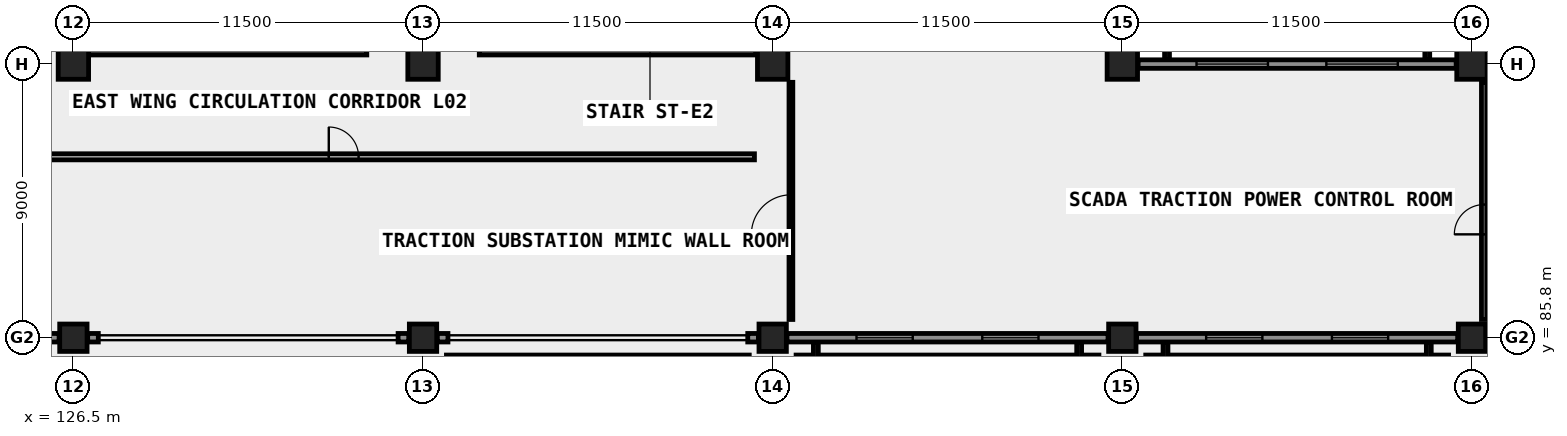
"""IFC4 building model, lengths in metres.
Left out: names, types, materials, properties, quantities, classifications, styles, units other than length and angle.
Written with IfcOpenShell. Run it as: python <this file> out.ifc"""

import sys

from ifc_helpers import new_model, si_unit, direction, frame, frame_2d, origin, origin_2d, place, context, subcontext, project, spatial, rectangle, extrude, element, fill, save


model = new_model("IFC4")
c1 = context("Model", 3, precision=1e-05, world=origin(), true_north=direction((0.0, 1.0)))
c2 = subcontext(c1, "Body", "Model", "MODEL_VIEW")
j1 = project(units=[si_unit("LENGTHUNIT", "METRE"), si_unit("PLANEANGLEUNIT", "RADIAN")], contexts=[c1])
p1 = place(None, origin())
s1 = spatial("IfcSite", under=j1, at=p1, CompositionType="ELEMENT")
p2 = place(p1, origin())
s2 = spatial("IfcBuilding", under=s1, at=p2, CompositionType="ELEMENT")
p3 = place(p2, frame((0.0, 0.0, 8.4)))
s3 = spatial("IfcBuildingStorey", under=s2, at=p3, CompositionType="ELEMENT", Elevation=8.4)
p4 = place(p3, frame((126.5, 85.8, 0.0), z_axis=(0.0, 0.0, 1.0), x_axis=(1.0, 0.0, 0.0)))
e1 = element("IfcColumn", 1, at=p4, inside=s3, PredefinedType="COLUMN", context=c2, shape_type="SweptSolid", body=[
    extrude(rectangle(XDim=0.9, YDim=0.9, at=origin_2d()), origin(), (0.0, 0.0, 1.0), 5.4),
])
p5 = place(p3, frame((126.5, 94.8, 0.0), z_axis=(0.0, 0.0, 1.0), x_axis=(1.0, 0.0, 0.0)))
e2 = element("IfcColumn", 2, at=p5, inside=s3, PredefinedType="COLUMN", context=c2, shape_type="SweptSolid", body=[
    extrude(rectangle(XDim=1.0, YDim=1.0, at=origin_2d()), origin(), (0.0, 0.0, 1.0), 5.4),
])
p6 = place(p3, frame((138.0, 85.8, 0.0), z_axis=(0.0, 0.0, 1.0), x_axis=(1.0, 0.0, 0.0)))
e3 = element("IfcColumn", 3, at=p6, inside=s3, PredefinedType="COLUMN", context=c2, shape_type="SweptSolid", body=[
    extrude(rectangle(XDim=0.9, YDim=0.9, at=origin_2d()), origin(), (0.0, 0.0, 1.0), 5.4),
])
p7 = place(p3, frame((138.0, 94.8, 0.0), z_axis=(0.0, 0.0, 1.0), x_axis=(1.0, 0.0, 0.0)))
e4 = element("IfcColumn", 4, at=p7, inside=s3, PredefinedType="COLUMN", context=c2, shape_type="SweptSolid", body=[
    extrude(rectangle(XDim=1.0, YDim=1.0, at=origin_2d()), origin(), (0.0, 0.0, 1.0), 5.4),
])
p8 = place(p3, frame((149.5, 85.8, 0.0), z_axis=(0.0, 0.0, 1.0), x_axis=(1.0, 0.0, 0.0)))
e5 = element("IfcColumn", 5, at=p8, inside=s3, PredefinedType="COLUMN", context=c2, shape_type="SweptSolid", body=[
    extrude(rectangle(XDim=0.9, YDim=0.9, at=origin_2d()), origin(), (0.0, 0.0, 1.0), 5.4),
])
p9 = place(p3, frame((149.5, 94.8, 0.0), z_axis=(0.0, 0.0, 1.0), x_axis=(1.0, 0.0, 0.0)))
e6 = element("IfcColumn", 6, at=p9, inside=s3, PredefinedType="COLUMN", context=c2, shape_type="SweptSolid", body=[
    extrude(rectangle(XDim=1.0, YDim=1.0, at=origin_2d()), origin(), (0.0, 0.0, 1.0), 5.4),
])
p10 = place(p3, frame((161.0, 85.8, 0.0), z_axis=(0.0, 0.0, 1.0), x_axis=(1.0, 0.0, 0.0)))
e7 = element("IfcColumn", 7, at=p10, inside=s3, PredefinedType="COLUMN", context=c2, shape_type="SweptSolid", body=[
    extrude(rectangle(XDim=0.9, YDim=0.9, at=origin_2d()), origin(), (0.0, 0.0, 1.0), 5.4),
])
p11 = place(p3, frame((161.0, 94.8, 0.0), z_axis=(0.0, 0.0, 1.0), x_axis=(1.0, 0.0, 0.0)))
e8 = element("IfcColumn", 8, at=p11, inside=s3, PredefinedType="COLUMN", context=c2, shape_type="SweptSolid", body=[
    extrude(rectangle(XDim=1.0, YDim=1.0, at=origin_2d()), origin(), (0.0, 0.0, 1.0), 5.4),
])
p12 = place(p3, frame((172.5, 85.8, 0.0), z_axis=(0.0, 0.0, 1.0), x_axis=(1.0, 0.0, 0.0)))
e9 = element("IfcColumn", 9, at=p12, inside=s3, PredefinedType="COLUMN", context=c2, shape_type="SweptSolid", body=[
    extrude(rectangle(XDim=0.9, YDim=0.9, at=origin_2d()), origin(), (0.0, 0.0, 1.0), 5.4),
])
p13 = place(p3, frame((172.5, 94.8, 0.0), z_axis=(0.0, 0.0, 1.0), x_axis=(1.0, 0.0, 0.0)))
e10 = element("IfcColumn", 10, at=p13, inside=s3, PredefinedType="COLUMN", context=c2, shape_type="SweptSolid", body=[
    extrude(rectangle(XDim=1.0, YDim=1.0, at=origin_2d()), origin(), (0.0, 0.0, 1.0), 5.4),
])
p14 = place(p3, frame((127.0, 95.325, 0.0), z_axis=(0.0, 0.0, 1.0), x_axis=(1.0, 0.0, 0.0)))
e11 = element("IfcWall", 11, at=p14, inside=s3, PredefinedType="SHEAR", context=c2, shape_type="SweptSolid", body=[
    extrude(rectangle(XDim=9.15, YDim=0.45, at=frame_2d((4.575, 0.0))), origin(), (0.0, 0.0, 1.0), 5.4),
])
p15 = place(p3, frame((139.85, 95.325, 0.0), z_axis=(0.0, 0.0, 1.0), x_axis=(1.0, 0.0, 0.0)))
e12 = element("IfcWall", 12, at=p15, inside=s3, PredefinedType="SHEAR", context=c2, shape_type="SweptSolid", body=[
    extrude(rectangle(XDim=9.1, YDim=0.45, at=frame_2d((4.55, 0.0))), origin(), (0.0, 0.0, 1.0), 5.4),
])
p16 = place(p3, frame((115.47, 85.8, 0.0), z_axis=(0.0, 0.0, 1.0), x_axis=(1.0, 0.0, 0.0)))
e13 = element("IfcWall", 13, at=p16, inside=s3, PredefinedType="SOLIDWALL", context=c2, shape_type="SweptSolid", body=[
    extrude(rectangle(XDim=10.56, YDim=0.28, at=frame_2d((5.28, 0.0))), origin(), (0.0, 0.0, 1.0), 4.35),
])
p17 = place(p16, frame((2.287, 0.0, 0.85)))
e14 = element("IfcOpeningElement", 14, at=p17, cuts=e13, PredefinedType="OPENING", context=c2, shape_type="SweptSolid", body=[
    extrude(rectangle(XDim=1.85, YDim=1.85, at=frame_2d((0.925, 0.925))), frame((0.0, 0.15, 0.0), z_axis=(0.0, -1.0, 0.0), x_axis=(1.0, 0.0, 0.0)), (0.0, 0.0, 1.0), 0.3),
])
p18 = place(p16, frame((6.423, 0.0, 0.85)))
e15 = element("IfcOpeningElement", 15, at=p18, cuts=e13, PredefinedType="OPENING", context=c2, shape_type="SweptSolid", body=[
    extrude(rectangle(XDim=1.85, YDim=1.85, at=frame_2d((0.925, 0.925))), frame((0.0, 0.15, 0.0), z_axis=(0.0, -1.0, 0.0), x_axis=(1.0, 0.0, 0.0)), (0.0, 0.0, 1.0), 0.3),
])
for number, where, z_axis, x_axis in (
    (16, (126.97, 85.8, 0.0), (0.0, 0.0, 1.0), (1.0, 0.0, 0.0)),
    (17, (137.18, 85.8, 0.0), (0.0, 0.0, 1.0), (1.0, 0.0, 0.0)),
    (18, (138.47, 85.8, 0.0), (0.0, 0.0, 1.0), (1.0, 0.0, 0.0)),
    (19, (148.68, 85.8, 0.0), (0.0, 0.0, 1.0), (1.0, 0.0, 0.0)),
):
    element("IfcWall", number, at=place(p3, frame(where, z_axis=z_axis, x_axis=x_axis)), inside=s3, PredefinedType="SOLIDWALL", context=c2, shape_type="SweptSolid", body=[
        extrude(rectangle(XDim=0.35, YDim=0.28, at=frame_2d((0.175, 0.0))), origin(), (0.0, 0.0, 1.0), 5.13),
    ])
p19 = place(p3, frame((149.97, 85.8, 0.0), z_axis=(0.0, 0.0, 1.0), x_axis=(1.0, 0.0, 0.0)))
e20 = element("IfcWall", 20, at=p19, inside=s3, PredefinedType="SOLIDWALL", context=c2, shape_type="SweptSolid", body=[
    extrude(rectangle(XDim=10.56, YDim=0.28, at=frame_2d((5.28, 0.0))), origin(), (0.0, 0.0, 1.0), 4.35),
])
p20 = place(p19, frame((2.287, 0.0, 0.85)))
e21 = element("IfcOpeningElement", 21, at=p20, cuts=e20, PredefinedType="OPENING", context=c2, shape_type="SweptSolid", body=[
    extrude(rectangle(XDim=1.85, YDim=1.85, at=frame_2d((0.925, 0.925))), frame((0.0, 0.15, 0.0), z_axis=(0.0, -1.0, 0.0), x_axis=(1.0, 0.0, 0.0)), (0.0, 0.0, 1.0), 0.3),
])
p21 = place(p19, frame((6.423, 0.0, 0.85)))
e22 = element("IfcOpeningElement", 22, at=p21, cuts=e20, PredefinedType="OPENING", context=c2, shape_type="SweptSolid", body=[
    extrude(rectangle(XDim=1.85, YDim=1.85, at=frame_2d((0.925, 0.925))), frame((0.0, 0.15, 0.0), z_axis=(0.0, -1.0, 0.0), x_axis=(1.0, 0.0, 0.0)), (0.0, 0.0, 1.0), 0.3),
])
p22 = place(p3, frame((161.47, 85.8, 0.0), z_axis=(0.0, 0.0, 1.0), x_axis=(1.0, 0.0, 0.0)))
e23 = element("IfcWall", 23, at=p22, inside=s3, PredefinedType="SOLIDWALL", context=c2, shape_type="SweptSolid", body=[
    extrude(rectangle(XDim=10.56, YDim=0.28, at=frame_2d((5.28, 0.0))), origin(), (0.0, 0.0, 1.0), 4.35),
])
p23 = place(p22, frame((2.287, 0.0, 0.85)))
e24 = element("IfcOpeningElement", 24, at=p23, cuts=e23, PredefinedType="OPENING", context=c2, shape_type="SweptSolid", body=[
    extrude(rectangle(XDim=1.85, YDim=1.85, at=frame_2d((0.925, 0.925))), frame((0.0, 0.15, 0.0), z_axis=(0.0, -1.0, 0.0), x_axis=(1.0, 0.0, 0.0)), (0.0, 0.0, 1.0), 0.3),
])
p24 = place(p22, frame((6.423, 0.0, 0.85)))
e25 = element("IfcOpeningElement", 25, at=p24, cuts=e23, PredefinedType="OPENING", context=c2, shape_type="SweptSolid", body=[
    extrude(rectangle(XDim=1.85, YDim=1.85, at=frame_2d((0.925, 0.925))), frame((0.0, 0.15, 0.0), z_axis=(0.0, -1.0, 0.0), x_axis=(1.0, 0.0, 0.0)), (0.0, 0.0, 1.0), 0.3),
])
p25 = place(p3, frame((172.97, 85.8, 0.0), z_axis=(0.0, 0.0, 1.0), x_axis=(1.0, 0.0, 0.0)))
e26 = element("IfcWall", 26, at=p25, inside=s3, PredefinedType="SOLIDWALL", context=c2, shape_type="SweptSolid", body=[
    extrude(rectangle(XDim=10.56, YDim=0.28, at=frame_2d((5.28, 0.0))), origin(), (0.0, 0.0, 1.0), 4.35),
])
p26 = place(p25, frame((2.287, 0.0, 0.85)))
e27 = element("IfcOpeningElement", 27, at=p26, cuts=e26, PredefinedType="OPENING", context=c2, shape_type="SweptSolid", body=[
    extrude(rectangle(XDim=1.85, YDim=1.85, at=frame_2d((0.925, 0.925))), frame((0.0, 0.15, 0.0), z_axis=(0.0, -1.0, 0.0), x_axis=(1.0, 0.0, 0.0)), (0.0, 0.0, 1.0), 0.3),
])
p27 = place(p25, frame((6.423, 0.0, 0.85)))
e28 = element("IfcOpeningElement", 28, at=p27, cuts=e26, PredefinedType="OPENING", context=c2, shape_type="SweptSolid", body=[
    extrude(rectangle(XDim=1.85, YDim=1.85, at=frame_2d((0.925, 0.925))), frame((0.0, 0.15, 0.0), z_axis=(0.0, -1.0, 0.0), x_axis=(1.0, 0.0, 0.0)), (0.0, 0.0, 1.0), 0.3),
])
p28 = place(p3, frame((161.52, 94.8, 0.0), z_axis=(0.0, 0.0, 1.0), x_axis=(1.0, 0.0, 0.0)))
e29 = element("IfcWall", 29, at=p28, inside=s3, PredefinedType="SOLIDWALL", context=c2, shape_type="SweptSolid", body=[
    extrude(rectangle(XDim=10.46, YDim=0.28, at=frame_2d((5.23, 0.0))), origin(), (0.0, 0.0, 1.0), 4.35),
])
p29 = place(p28, frame((1.92, 0.0, 0.85)))
e30 = element("IfcOpeningElement", 30, at=p29, cuts=e29, PredefinedType="OPENING", context=c2, shape_type="SweptSolid", body=[
    extrude(rectangle(XDim=2.35, YDim=2.05, at=frame_2d((1.175, 1.025))), frame((0.0, 0.15, 0.0), z_axis=(0.0, -1.0, 0.0), x_axis=(1.0, 0.0, 0.0)), (0.0, 0.0, 1.0), 0.3),
])
p30 = place(p28, frame((6.19, 0.0, 0.85)))
e31 = element("IfcOpeningElement", 31, at=p30, cuts=e29, PredefinedType="OPENING", context=c2, shape_type="SweptSolid", body=[
    extrude(rectangle(XDim=2.35, YDim=2.05, at=frame_2d((1.175, 1.025))), frame((0.0, 0.15, 0.0), z_axis=(0.0, -1.0, 0.0), x_axis=(1.0, 0.0, 0.0)), (0.0, 0.0, 1.0), 0.3),
])
p31 = place(p3, frame((118.4, 91.75, 0.0), z_axis=(0.0, 0.0, 1.0), x_axis=(1.0, 0.0, 0.0)))
e32 = element("IfcWall", 32, at=p31, inside=s3, PredefinedType="PARTITIONING", context=c2, shape_type="SweptSolid", body=[
    extrude(rectangle(XDim=30.5, YDim=0.2, at=frame_2d((15.25, 0.0))), origin(), (0.0, 0.0, 1.0), 5.12),
])
p32 = place(p31, frame((4.2, 0.0, 0.0)))
e33 = element("IfcOpeningElement", 33, at=p32, cuts=e32, PredefinedType="OPENING", context=c2, shape_type="SweptSolid", body=[
    extrude(rectangle(XDim=1.8, YDim=2.2, at=frame_2d((0.9, 1.1))), frame((0.0, 0.11, 0.0), z_axis=(0.0, -1.0, 0.0), x_axis=(1.0, 0.0, 0.0)), (0.0, 0.0, 1.0), 0.22),
])
p33 = place(p31, frame((16.5, 0.0, 0.0)))
e34 = element("IfcOpeningElement", 34, at=p33, cuts=e32, PredefinedType="OPENING", context=c2, shape_type="SweptSolid", body=[
    extrude(rectangle(XDim=0.98, YDim=2.15, at=frame_2d((0.49, 1.075))), frame((0.0, 0.11, 0.0), z_axis=(0.0, -1.0, 0.0), x_axis=(1.0, 0.0, 0.0)), (0.0, 0.0, 1.0), 0.22),
])
p34 = place(p3, frame((150.1, 86.4, 0.0), z_axis=(0.0, 0.0, 1.0), x_axis=(0.0, 1.0, 0.0)))
e35 = element("IfcWall", 35, at=p34, inside=s3, PredefinedType="MOVABLE", context=c2, shape_type="SweptSolid", body=[
    extrude(rectangle(XDim=7.8, YDim=0.125, at=frame_2d((3.9, 0.0))), origin(), (0.0, 0.0, 1.0), 5.12),
])
p35 = place(p34, frame((2.8, 0.0, 0.0)))
e36 = element("IfcOpeningElement", 36, at=p35, cuts=e35, PredefinedType="OPENING", context=c2, shape_type="SweptSolid", body=[
    extrude(rectangle(XDim=1.3, YDim=2.2, at=frame_2d((0.65, 1.1))), frame((0.0, 0.073, 0.0), z_axis=(0.0, -1.0, 0.0), x_axis=(1.0, 0.0, 0.0)), (0.0, 0.0, 1.0), 0.145),
])
p36 = place(p3, frame((172.9, 86.4, 0.0), z_axis=(0.0, 0.0, 1.0), x_axis=(0.0, 1.0, 0.0)))
e37 = element("IfcWall", 37, at=p36, inside=s3, PredefinedType="PARTITIONING", context=c2, shape_type="SweptSolid", body=[
    extrude(rectangle(XDim=7.8, YDim=0.175, at=frame_2d((3.9, 0.0))), origin(), (0.0, 0.0, 1.0), 5.12),
])
p37 = place(p36, frame((2.8, 0.0, 0.0)))
e38 = element("IfcOpeningElement", 38, at=p37, cuts=e37, PredefinedType="OPENING", context=c2, shape_type="SweptSolid", body=[
    extrude(rectangle(XDim=0.98, YDim=2.15, at=frame_2d((0.49, 1.075))), frame((0.0, 0.098, 0.0), z_axis=(0.0, -1.0, 0.0), x_axis=(1.0, 0.0, 0.0)), (0.0, 0.0, 1.0), 0.195),
])
p38 = place(p20, origin())
e39 = element("IfcWindow", 39, at=p38, inside=s3, PartitioningType="SINGLE_PANEL", PredefinedType="WINDOW", context=c2, shape_type="SweptSolid", body=[
    extrude(rectangle(XDim=1.85, YDim=1.85, at=frame_2d((0.925, 0.925))), frame((0.0, 0.03, 0.0), z_axis=(0.0, -1.0, 0.0), x_axis=(1.0, 0.0, 0.0)), (0.0, 0.0, 1.0), 0.06),
])
fill(e21, e39)
p39 = place(p21, origin())
e40 = element("IfcWindow", 40, at=p39, inside=s3, PartitioningType="SINGLE_PANEL", PredefinedType="WINDOW", context=c2, shape_type="SweptSolid", body=[
    extrude(rectangle(XDim=1.85, YDim=1.85, at=frame_2d((0.925, 0.925))), frame((0.0, 0.03, 0.0), z_axis=(0.0, -1.0, 0.0), x_axis=(1.0, 0.0, 0.0)), (0.0, 0.0, 1.0), 0.06),
])
fill(e22, e40)
p40 = place(p23, origin())
e41 = element("IfcWindow", 41, at=p40, inside=s3, PartitioningType="SINGLE_PANEL", PredefinedType="WINDOW", context=c2, shape_type="SweptSolid", body=[
    extrude(rectangle(XDim=1.85, YDim=1.85, at=frame_2d((0.925, 0.925))), frame((0.0, 0.03, 0.0), z_axis=(0.0, -1.0, 0.0), x_axis=(1.0, 0.0, 0.0)), (0.0, 0.0, 1.0), 0.06),
])
fill(e24, e41)
p41 = place(p24, origin())
e42 = element("IfcWindow", 42, at=p41, inside=s3, PartitioningType="SINGLE_PANEL", PredefinedType="WINDOW", context=c2, shape_type="SweptSolid", body=[
    extrude(rectangle(XDim=1.85, YDim=1.85, at=frame_2d((0.925, 0.925))), frame((0.0, 0.03, 0.0), z_axis=(0.0, -1.0, 0.0), x_axis=(1.0, 0.0, 0.0)), (0.0, 0.0, 1.0), 0.06),
])
fill(e25, e42)
p42 = place(p29, origin())
e43 = element("IfcWindow", 43, at=p42, inside=s3, PartitioningType="SINGLE_PANEL", PredefinedType="WINDOW", context=c2, shape_type="SweptSolid", body=[
    extrude(rectangle(XDim=2.35, YDim=2.05, at=frame_2d((1.175, 1.025))), frame((0.0, 0.03, 0.0), z_axis=(0.0, -1.0, 0.0), x_axis=(1.0, 0.0, 0.0)), (0.0, 0.0, 1.0), 0.06),
])
fill(e30, e43)
p43 = place(p30, origin())
e44 = element("IfcWindow", 44, at=p43, inside=s3, PartitioningType="SINGLE_PANEL", PredefinedType="WINDOW", context=c2, shape_type="SweptSolid", body=[
    extrude(rectangle(XDim=2.35, YDim=2.05, at=frame_2d((1.175, 1.025))), frame((0.0, 0.03, 0.0), z_axis=(0.0, -1.0, 0.0), x_axis=(1.0, 0.0, 0.0)), (0.0, 0.0, 1.0), 0.06),
])
fill(e31, e44)
p44 = place(p33, origin())
e45 = element("IfcDoor", 45, at=p44, inside=s3, OperationType="SINGLE_SWING_LEFT", PredefinedType="DOOR", context=c2, shape_type="SweptSolid", body=[
    extrude(rectangle(XDim=0.98, YDim=2.15, at=frame_2d((0.49, 1.075))), frame((0.0, 0.025, 0.0), z_axis=(0.0, -1.0, 0.0), x_axis=(1.0, 0.0, 0.0)), (0.0, 0.0, 1.0), 0.05),
])
fill(e34, e45)
p45 = place(p35, origin())
e46 = element("IfcDoor", 46, at=p45, inside=s3, OperationType="SINGLE_SWING_LEFT", PredefinedType="DOOR", context=c2, shape_type="SweptSolid", body=[
    extrude(rectangle(XDim=1.3, YDim=2.2, at=frame_2d((0.65, 1.1))), frame((0.0, 0.025, 0.0), z_axis=(0.0, -1.0, 0.0), x_axis=(1.0, 0.0, 0.0)), (0.0, 0.0, 1.0), 0.05),
])
fill(e36, e46)
p46 = place(p37, origin())
e47 = element("IfcDoor", 47, at=p46, inside=s3, OperationType="SINGLE_SWING_LEFT", PredefinedType="DOOR", context=c2, shape_type="SweptSolid", body=[
    extrude(rectangle(XDim=0.98, YDim=2.15, at=frame_2d((0.49, 1.075))), frame((0.0, 0.025, 0.0), z_axis=(0.0, -1.0, 0.0), x_axis=(1.0, 0.0, 0.0)), (0.0, 0.0, 1.0), 0.05),
])
fill(e38, e47)
save(model, sys.argv[1])
